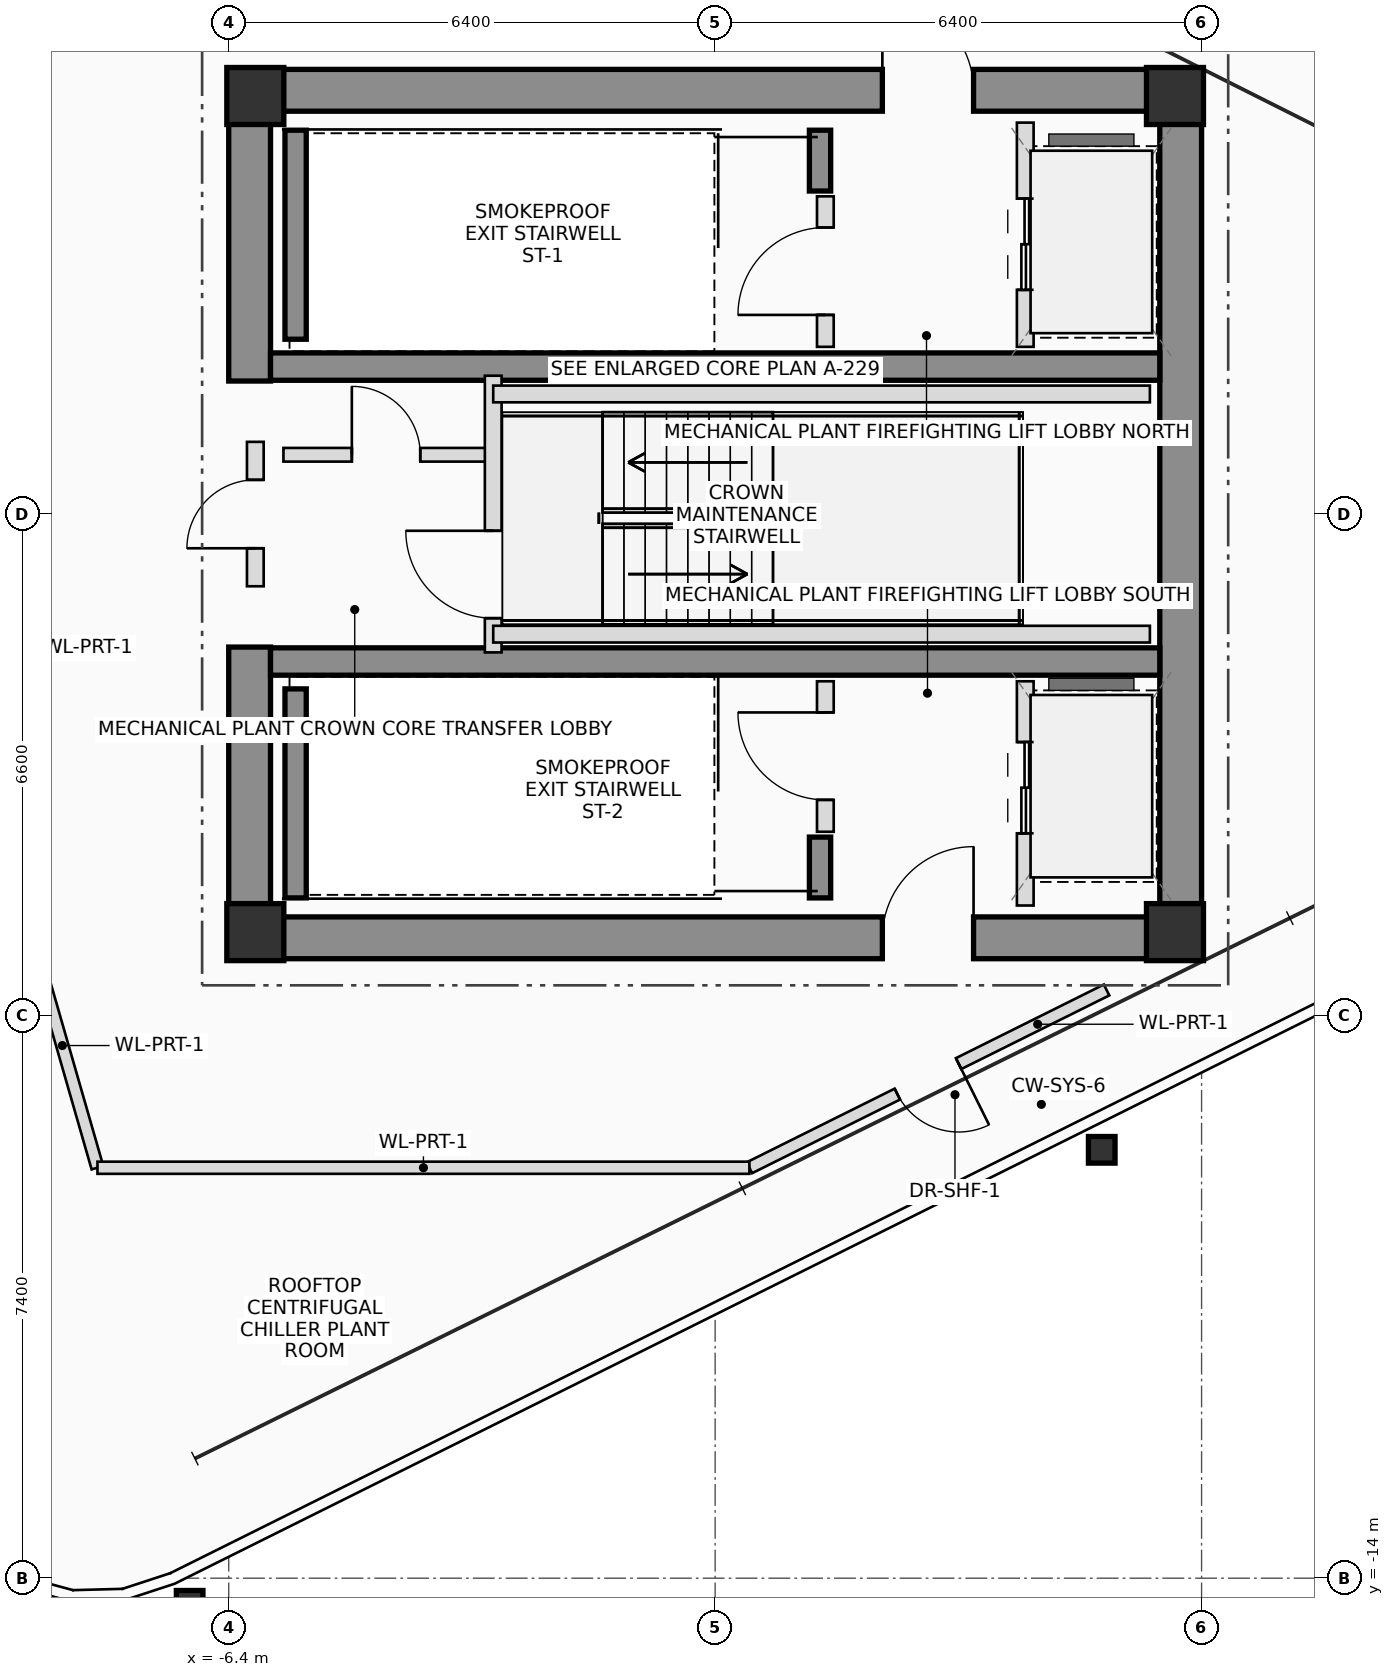
"""IFC4 building model, lengths in metres.
Left out: names, types, materials, properties, quantities, classifications, styles, units other than length and angle.
Written with IfcOpenShell. Run it as: python <this file> out.ifc"""

import sys

from ifc_helpers import new_model, si_unit, direction, frame, frame_2d, origin, origin_2d, place, context, subcontext, project, spatial, rectangle, i_section, extrude, source, transform, mapped, element, fill, save


model = new_model("IFC4")
c1 = context("Model", 3, precision=1e-05, world=origin(), true_north=direction((0.0, 1.0)))
c2 = subcontext(c1, "Body", "Model", "MODEL_VIEW")
j1 = project(units=[si_unit("LENGTHUNIT", "METRE"), si_unit("PLANEANGLEUNIT", "RADIAN")], contexts=[c1])
p1 = place(None, origin())
s1 = spatial("IfcSite", under=j1, at=p1, CompositionType="ELEMENT")
p2 = place(p1, origin())
s2 = spatial("IfcBuilding", under=s1, at=p2, CompositionType="ELEMENT")
p3 = place(p2, frame((0.0, 0.0, 322.85)))
s3 = spatial("IfcBuildingStorey", under=s2, at=p3, CompositionType="ELEMENT", Elevation=322.85)
m1 = source(origin(), c2, "Body", "SweptSolid", [
    extrude(rectangle(XDim=0.75, YDim=0.75, at=origin_2d()), origin(), (0.0, 0.0, 1.0), 5.4),
])
for number, where, z_axis, x_axis in (
    (1, (-6.05, -5.5, 0.0), (0.0, 0.0, 1.0), (1.0, 0.0, 0.0)),
    (2, (6.05, -5.5, 0.0), (0.0, 0.0, 1.0), (1.0, 0.0, 0.0)),
    (3, (6.05, 5.5, 0.0), (0.0, 0.0, 1.0), (1.0, 0.0, 0.0)),
    (4, (-6.05, 5.5, 0.0), (0.0, 0.0, 1.0), (1.0, 0.0, 0.0)),
):
    element("IfcColumn", number, at=place(p3, frame(where, z_axis=z_axis, x_axis=x_axis)), inside=s3, PredefinedType="COLUMN", context=c2, shape_type="MappedRepresentation", body=[
        mapped(m1, transform((0.0, 0.0, 0.0), scale=1.0)),
    ])
p4 = place(p3, frame((-6.4, 5.575, 0.0), z_axis=(0.0, 0.0, 1.0), x_axis=(1.0, 0.0, 0.0)))
e5 = element("IfcWall", 5, at=p4, inside=s3, PredefinedType="SHEAR", context=c2, shape_type="SweptSolid", body=[
    extrude(rectangle(XDim=12.8, YDim=0.55, at=frame_2d((6.4, 0.0))), origin(), (0.0, 0.0, 1.0), 5.4),
])
p5 = place(p4, frame((8.6, 0.0, 0.0)))
e6 = element("IfcOpeningElement", 6, at=p5, cuts=e5, PredefinedType="OPENING", context=c2, shape_type="SweptSolid", body=[
    extrude(rectangle(XDim=1.2, YDim=2.2, at=frame_2d((0.6, 1.1))), frame((0.0, 0.285, 0.0), z_axis=(0.0, -1.0, 0.0), x_axis=(1.0, 0.0, 0.0)), (0.0, 0.0, 1.0), 0.57),
])
p6 = place(p3, frame((-6.4, -5.575, 0.0), z_axis=(0.0, 0.0, 1.0), x_axis=(1.0, 0.0, 0.0)))
e7 = element("IfcWall", 7, at=p6, inside=s3, PredefinedType="SHEAR", context=c2, shape_type="SweptSolid", body=[
    extrude(rectangle(XDim=12.8, YDim=0.55, at=frame_2d((6.4, 0.0))), origin(), (0.0, 0.0, 1.0), 5.4),
])
p7 = place(p6, frame((8.6, 0.0, 0.0)))
e8 = element("IfcOpeningElement", 8, at=p7, cuts=e7, PredefinedType="OPENING", context=c2, shape_type="SweptSolid", body=[
    extrude(rectangle(XDim=1.2, YDim=2.2, at=frame_2d((0.6, 1.1))), frame((0.0, 0.285, 0.0), z_axis=(0.0, -1.0, 0.0), x_axis=(1.0, 0.0, 0.0)), (0.0, 0.0, 1.0), 0.57),
])
p8 = place(p3, frame((6.125, -5.3, 0.0), z_axis=(0.0, 0.0, 1.0), x_axis=(0.0, 1.0, 0.0)))
e9 = element("IfcWall", 9, at=p8, inside=s3, PredefinedType="SHEAR", context=c2, shape_type="SweptSolid", body=[
    extrude(rectangle(XDim=10.6, YDim=0.55, at=frame_2d((5.3, 0.0))), origin(), (0.0, 0.0, 1.0), 5.4),
])
for number, where, z_axis, x_axis in (
    (10, (-6.125, -5.3, 0.0), (0.0, 0.0, 1.0), (0.0, 1.0, 0.0)),
    (11, (-6.125, 1.75, 0.0), (0.0, 0.0, 1.0), (0.0, 1.0, 0.0)),
):
    element("IfcWall", number, at=place(p3, frame(where, z_axis=z_axis, x_axis=x_axis)), inside=s3, PredefinedType="SHEAR", context=c2, shape_type="SweptSolid", body=[
        extrude(rectangle(XDim=3.55, YDim=0.55, at=frame_2d((1.775, 0.0))), origin(), (0.0, 0.0, 1.0), 5.4),
    ])
for number, where, z_axis, x_axis in (
    (12, (-5.85, 1.94, 0.0), (0.0, 0.0, 1.0), (1.0, 0.0, 0.0)),
    (13, (-5.85, -1.94, 0.0), (0.0, 0.0, 1.0), (1.0, 0.0, 0.0)),
):
    element("IfcWall", number, at=place(p3, frame(where, z_axis=z_axis, x_axis=x_axis)), inside=s3, PredefinedType="SHEAR", context=c2, shape_type="SweptSolid", body=[
        extrude(rectangle(XDim=11.7, YDim=0.36, at=frame_2d((5.85, 0.0))), origin(), (0.0, 0.0, 1.0), 5.4),
    ])
p9 = place(p3, frame((-5.52, 2.3, 0.0), z_axis=(0.0, 0.0, 1.0), x_axis=(0.0, 1.0, 0.0)))
e14 = element("IfcWall", 14, at=p9, inside=s3, PredefinedType="SHEAR", context=c2, shape_type="SweptSolid", body=[
    extrude(rectangle(XDim=2.75, YDim=0.28, at=frame_2d((1.375, 0.0))), origin(), (0.0, 0.0, 1.0), 5.4),
])
p10 = place(p3, frame((1.38, 4.25, 0.0), z_axis=(0.0, 0.0, 1.0), x_axis=(0.0, 1.0, 0.0)))
e15 = element("IfcWall", 15, at=p10, inside=s3, PredefinedType="SHEAR", context=c2, shape_type="SweptSolid", body=[
    extrude(rectangle(XDim=0.8, YDim=0.28, at=frame_2d((0.4, 0.0))), origin(), (0.0, 0.0, 1.0), 5.4),
])
p11 = place(p3, frame((-5.52, -5.05, 0.0), z_axis=(0.0, 0.0, 1.0), x_axis=(0.0, 1.0, 0.0)))
e16 = element("IfcWall", 16, at=p11, inside=s3, PredefinedType="SHEAR", context=c2, shape_type="SweptSolid", body=[
    extrude(rectangle(XDim=2.75, YDim=0.28, at=frame_2d((1.375, 0.0))), origin(), (0.0, 0.0, 1.0), 5.4),
])
p12 = place(p3, frame((1.38, -5.05, 0.0), z_axis=(0.0, 0.0, 1.0), x_axis=(0.0, 1.0, 0.0)))
e17 = element("IfcWall", 17, at=p12, inside=s3, PredefinedType="SHEAR", context=c2, shape_type="SweptSolid", body=[
    extrude(rectangle(XDim=0.8, YDim=0.28, at=frame_2d((0.4, 0.0))), origin(), (0.0, 0.0, 1.0), 5.4),
])
m2 = source(origin(), c2, "Body", "SweptSolid", [
    extrude(i_section(OverallWidth=0.35, OverallDepth=0.35, WebThickness=0.012, FlangeThickness=0.019, FilletRadius=0.016, at=origin_2d()), origin(), (0.0, 0.0, 1.0), 5.4),
])
for number, where, z_axis, x_axis in (
    (18, (-6.914, -14.337, 0.0), (0.0, 0.0, 1.0), (1.0, 0.0, 0.0)),
    (19, (5.086, -8.364, 0.0), (0.0, 0.0, 1.0), (1.0, 0.0, 0.0)),
):
    element("IfcColumn", number, at=place(p3, frame(where, z_axis=z_axis, x_axis=x_axis)), inside=s3, PredefinedType="COLUMN", context=c2, shape_type="MappedRepresentation", body=[
        mapped(m2, transform((0.0, 0.0, 0.0), scale=1.0)),
    ])
p13 = place(p3, frame((-6.05, -0.95, 0.0), z_axis=(0.0, 0.0, 1.0), x_axis=(0.0, 1.0, 0.0)))
e20 = element("IfcWall", 20, at=p13, inside=s3, PredefinedType="PLUMBINGWALL", context=c2, shape_type="SweptSolid", body=[
    extrude(rectangle(XDim=1.9, YDim=0.22, at=frame_2d((0.95, 0.0))), origin(), (0.0, 0.0, 1.0), 4.1),
])
p14 = place(p13, frame((0.5, 0.0, 0.0)))
e21 = element("IfcOpeningElement", 21, at=p14, cuts=e20, PredefinedType="OPENING", context=c2, shape_type="SweptSolid", body=[
    extrude(rectangle(XDim=0.9, YDim=2.05, at=frame_2d((0.45, 1.025))), frame((0.0, 0.12, 0.0), z_axis=(0.0, -1.0, 0.0), x_axis=(1.0, 0.0, 0.0)), (0.0, 0.0, 1.0), 0.24),
])
p15 = place(p3, frame((1.45, 2.2, 0.0), z_axis=(0.0, 0.0, 1.0), x_axis=(0.0, 1.0, 0.0)))
e22 = element("IfcWall", 22, at=p15, inside=s3, PredefinedType="PLUMBINGWALL", context=c2, shape_type="SweptSolid", body=[
    extrude(rectangle(XDim=1.98, YDim=0.22, at=frame_2d((0.99, 0.0))), origin(), (0.0, 0.0, 1.0), 5.12),
])
p16 = place(p15, frame((0.42, 0.0, 0.0)))
e23 = element("IfcOpeningElement", 23, at=p16, cuts=e22, PredefinedType="OPENING", context=c2, shape_type="SweptSolid", body=[
    extrude(rectangle(XDim=1.15, YDim=2.15, at=frame_2d((0.575, 1.075))), frame((0.0, 0.12, 0.0), z_axis=(0.0, -1.0, 0.0), x_axis=(1.0, 0.0, 0.0)), (0.0, 0.0, 1.0), 0.24),
])
p17 = place(p3, frame((4.08, 2.2, 0.0), z_axis=(0.0, 0.0, 1.0), x_axis=(0.0, 1.0, 0.0)))
e24 = element("IfcWall", 24, at=p17, inside=s3, PredefinedType="PLUMBINGWALL", context=c2, shape_type="SweptSolid", body=[
    extrude(rectangle(XDim=2.95, YDim=0.22, at=frame_2d((1.475, 0.0))), origin(), (0.0, 0.0, 1.0), 5.12),
])
p18 = place(p17, frame((0.75, 0.0, 0.0)))
e25 = element("IfcOpeningElement", 25, at=p18, cuts=e24, PredefinedType="OPENING", context=c2, shape_type="SweptSolid", body=[
    extrude(rectangle(XDim=1.2, YDim=2.25, at=frame_2d((0.6, 1.125))), frame((0.0, 0.12, 0.0), z_axis=(0.0, -1.0, 0.0), x_axis=(1.0, 0.0, 0.0)), (0.0, 0.0, 1.0), 0.24),
])
p19 = place(p3, frame((1.45, -4.18, 0.0), z_axis=(0.0, 0.0, 1.0), x_axis=(0.0, 1.0, 0.0)))
e26 = element("IfcWall", 26, at=p19, inside=s3, PredefinedType="PLUMBINGWALL", context=c2, shape_type="SweptSolid", body=[
    extrude(rectangle(XDim=1.98, YDim=0.22, at=frame_2d((0.99, 0.0))), origin(), (0.0, 0.0, 1.0), 5.12),
])
p20 = place(p19, frame((0.42, 0.0, 0.0)))
e27 = element("IfcOpeningElement", 27, at=p20, cuts=e26, PredefinedType="OPENING", context=c2, shape_type="SweptSolid", body=[
    extrude(rectangle(XDim=1.15, YDim=2.15, at=frame_2d((0.575, 1.075))), frame((0.0, 0.12, 0.0), z_axis=(0.0, -1.0, 0.0), x_axis=(1.0, 0.0, 0.0)), (0.0, 0.0, 1.0), 0.24),
])
p21 = place(p3, frame((4.08, -5.15, 0.0), z_axis=(0.0, 0.0, 1.0), x_axis=(0.0, 1.0, 0.0)))
e28 = element("IfcWall", 28, at=p21, inside=s3, PredefinedType="PLUMBINGWALL", context=c2, shape_type="SweptSolid", body=[
    extrude(rectangle(XDim=2.95, YDim=0.22, at=frame_2d((1.475, 0.0))), origin(), (0.0, 0.0, 1.0), 5.12),
])
p22 = place(p21, frame((0.95, 0.0, 0.0)))
e29 = element("IfcOpeningElement", 29, at=p22, cuts=e28, PredefinedType="OPENING", context=c2, shape_type="SweptSolid", body=[
    extrude(rectangle(XDim=1.2, YDim=2.25, at=frame_2d((0.6, 1.125))), frame((0.0, 0.12, 0.0), z_axis=(0.0, -1.0, 0.0), x_axis=(1.0, 0.0, 0.0)), (0.0, 0.0, 1.0), 0.24),
])
p23 = place(p3, frame((-5.68, 0.78, 0.0), z_axis=(0.0, 0.0, 1.0), x_axis=(1.0, 0.0, 0.0)))
e30 = element("IfcWall", 30, at=p23, inside=s3, PredefinedType="PLUMBINGWALL", context=c2, shape_type="SweptSolid", body=[
    extrude(rectangle(XDim=2.76, YDim=0.18, at=frame_2d((1.38, 0.0))), origin(), (0.0, 0.0, 1.0), 5.12),
])
p24 = place(p23, frame((0.9, 0.0, 0.0)))
e31 = element("IfcOpeningElement", 31, at=p24, cuts=e30, PredefinedType="OPENING", context=c2, shape_type="SweptSolid", body=[
    extrude(rectangle(XDim=0.9, YDim=2.05, at=frame_2d((0.45, 1.025))), frame((0.0, 0.1, 0.0), z_axis=(0.0, -1.0, 0.0), x_axis=(1.0, 0.0, 0.0)), (0.0, 0.0, 1.0), 0.2),
])
p25 = place(p3, frame((-2.92, -1.82, 0.0), z_axis=(0.0, 0.0, 1.0), x_axis=(0.0, 1.0, 0.0)))
e32 = element("IfcWall", 32, at=p25, inside=s3, PredefinedType="PLUMBINGWALL", context=c2, shape_type="SweptSolid", body=[
    extrude(rectangle(XDim=3.64, YDim=0.22, at=frame_2d((1.82, 0.0))), origin(), (0.0, 0.0, 1.0), 5.12),
])
p26 = place(p25, frame((0.45, 0.0, 0.0)))
e33 = element("IfcOpeningElement", 33, at=p26, cuts=e32, PredefinedType="OPENING", context=c2, shape_type="SweptSolid", body=[
    extrude(rectangle(XDim=1.15, YDim=2.15, at=frame_2d((0.575, 1.075))), frame((0.0, 0.12, 0.0), z_axis=(0.0, -1.0, 0.0), x_axis=(1.0, 0.0, 0.0)), (0.0, 0.0, 1.0), 0.24),
])
for number, where, z_axis, x_axis in (
    (34, (-2.92, 1.58, 0.0), (0.0, 0.0, 1.0), (1.0, 0.0, 0.0)),
    (35, (-2.92, -1.58, 0.0), (0.0, 0.0, 1.0), (1.0, 0.0, 0.0)),
):
    element("IfcWall", number, at=place(p3, frame(where, z_axis=z_axis, x_axis=x_axis)), inside=s3, PredefinedType="PLUMBINGWALL", context=c2, shape_type="SweptSolid", body=[
        extrude(rectangle(XDim=8.64, YDim=0.22, at=frame_2d((4.32, 0.0))), origin(), (0.0, 0.0, 1.0), 3.59),
    ])
p27 = place(p3, frame((-8.127, -8.6, 0.0), z_axis=(0.0, 0.0, 1.0), x_axis=(-0.276397565718, 0.961043383862, 0.0)))
e36 = element("IfcWall", 36, at=p27, inside=s3, PredefinedType="PARTITIONING", context=c2, shape_type="SweptSolid", body=[
    extrude(rectangle(XDim=3.346, YDim=0.16, at=frame_2d((1.673, 0.0))), origin(), (0.0, 0.0, 1.0), 5.12),
])
p28 = place(p3, frame((5.15, -6.261, 0.0), z_axis=(0.0, 0.0, 1.0), x_axis=(-0.895225733131, -0.445612933766, 0.0)))
e37 = element("IfcWall", 37, at=p28, inside=s3, PredefinedType="PARTITIONING", context=c2, shape_type="SweptSolid", body=[
    extrude(rectangle(XDim=5.249, YDim=0.16, at=frame_2d((2.625, 0.0))), origin(), (0.0, 0.0, 1.0), 5.12),
])
p29 = place(p28, frame((2.175, 0.0, 0.0)))
e38 = element("IfcOpeningElement", 38, at=p29, cuts=e37, PredefinedType="OPENING", context=c2, shape_type="SweptSolid", body=[
    extrude(rectangle(XDim=0.9, YDim=2.05, at=frame_2d((0.45, 1.025))), frame((0.0, 0.09, 0.0), z_axis=(0.0, -1.0, 0.0), x_axis=(1.0, 0.0, 0.0)), (0.0, 0.0, 1.0), 0.18),
])
p30 = place(p3, frame((0.451, -8.6, 0.0), z_axis=(0.0, 0.0, 1.0), x_axis=(-1.0, 0.0, 0.0)))
e39 = element("IfcWall", 39, at=p30, inside=s3, PredefinedType="PARTITIONING", context=c2, shape_type="SweptSolid", body=[
    extrude(rectangle(XDim=8.578, YDim=0.16, at=frame_2d((4.289, 0.0))), origin(), (0.0, 0.0, 1.0), 5.12),
])
p31 = place(p5, origin())
e40 = element("IfcDoor", 40, at=p31, inside=s3, OperationType="SINGLE_SWING_LEFT", PredefinedType="DOOR", context=c2, shape_type="SweptSolid", body=[
    extrude(rectangle(XDim=1.2, YDim=2.2, at=frame_2d((0.6, 1.1))), frame((0.0, 0.025, 0.0), z_axis=(0.0, -1.0, 0.0), x_axis=(1.0, 0.0, 0.0)), (0.0, 0.0, 1.0), 0.05),
])
fill(e6, e40)
p32 = place(p7, origin())
e41 = element("IfcDoor", 41, at=p32, inside=s3, OperationType="SINGLE_SWING_RIGHT", PredefinedType="DOOR", context=c2, shape_type="SweptSolid", body=[
    extrude(rectangle(XDim=1.2, YDim=2.2, at=frame_2d((0.6, 1.1))), frame((0.0, 0.025, 0.0), z_axis=(0.0, -1.0, 0.0), x_axis=(1.0, 0.0, 0.0)), (0.0, 0.0, 1.0), 0.05),
])
fill(e8, e41)
p33 = place(p14, origin())
e42 = element("IfcDoor", 42, at=p33, inside=s3, OperationType="SINGLE_SWING_LEFT", PredefinedType="DOOR", context=c2, shape_type="SweptSolid", body=[
    extrude(rectangle(XDim=0.9, YDim=2.05, at=frame_2d((0.45, 1.025))), frame((0.0, 0.025, 0.0), z_axis=(0.0, -1.0, 0.0), x_axis=(1.0, 0.0, 0.0)), (0.0, 0.0, 1.0), 0.05),
])
fill(e21, e42)
p34 = place(p16, origin())
e43 = element("IfcDoor", 43, at=p34, inside=s3, OperationType="SINGLE_SWING_LEFT", PredefinedType="DOOR", context=c2, shape_type="SweptSolid", body=[
    extrude(rectangle(XDim=1.15, YDim=2.15, at=frame_2d((0.575, 1.075))), frame((0.0, 0.025, 0.0), z_axis=(0.0, -1.0, 0.0), x_axis=(1.0, 0.0, 0.0)), (0.0, 0.0, 1.0), 0.05),
])
fill(e23, e43)
p35 = place(p18, origin())
e44 = element("IfcDoor", 44, at=p35, inside=s3, OperationType="DOUBLE_DOOR_SLIDING", PredefinedType="DOOR", context=c2, shape_type="SweptSolid", body=[
    extrude(rectangle(XDim=1.2, YDim=2.25, at=frame_2d((0.6, 1.125))), frame((0.0, 0.025, 0.0), z_axis=(0.0, -1.0, 0.0), x_axis=(1.0, 0.0, 0.0)), (0.0, 0.0, 1.0), 0.05),
])
fill(e25, e44)
p36 = place(p20, origin())
e45 = element("IfcDoor", 45, at=p36, inside=s3, OperationType="SINGLE_SWING_RIGHT", PredefinedType="DOOR", context=c2, shape_type="SweptSolid", body=[
    extrude(rectangle(XDim=1.15, YDim=2.15, at=frame_2d((0.575, 1.075))), frame((0.0, 0.025, 0.0), z_axis=(0.0, -1.0, 0.0), x_axis=(1.0, 0.0, 0.0)), (0.0, 0.0, 1.0), 0.05),
])
fill(e27, e45)
p37 = place(p22, origin())
e46 = element("IfcDoor", 46, at=p37, inside=s3, OperationType="DOUBLE_DOOR_SLIDING", PredefinedType="DOOR", context=c2, shape_type="SweptSolid", body=[
    extrude(rectangle(XDim=1.2, YDim=2.25, at=frame_2d((0.6, 1.125))), frame((0.0, 0.025, 0.0), z_axis=(0.0, -1.0, 0.0), x_axis=(1.0, 0.0, 0.0)), (0.0, 0.0, 1.0), 0.05),
])
fill(e29, e46)
p38 = place(p24, origin())
e47 = element("IfcDoor", 47, at=p38, inside=s3, OperationType="SINGLE_SWING_LEFT", PredefinedType="DOOR", context=c2, shape_type="SweptSolid", body=[
    extrude(rectangle(XDim=0.9, YDim=2.05, at=frame_2d((0.45, 1.025))), frame((0.0, 0.025, 0.0), z_axis=(0.0, -1.0, 0.0), x_axis=(1.0, 0.0, 0.0)), (0.0, 0.0, 1.0), 0.05),
])
fill(e31, e47)
p39 = place(p26, origin())
e48 = element("IfcDoor", 48, at=p39, inside=s3, OperationType="SINGLE_SWING_RIGHT", PredefinedType="DOOR", context=c2, shape_type="SweptSolid", body=[
    extrude(rectangle(XDim=1.15, YDim=2.15, at=frame_2d((0.575, 1.075))), frame((0.0, 0.025, 0.0), z_axis=(0.0, -1.0, 0.0), x_axis=(1.0, 0.0, 0.0)), (0.0, 0.0, 1.0), 0.05),
])
fill(e33, e48)
p40 = place(p29, origin())
e49 = element("IfcDoor", 49, at=p40, inside=s3, OperationType="SINGLE_SWING_LEFT", PredefinedType="DOOR", context=c2, shape_type="SweptSolid", body=[
    extrude(rectangle(XDim=0.9, YDim=2.05, at=frame_2d((0.45, 1.025))), frame((0.0, 0.025, 0.0), z_axis=(0.0, -1.0, 0.0), x_axis=(1.0, 0.0, 0.0)), (0.0, 0.0, 1.0), 0.05),
])
fill(e38, e49)
save(model, sys.argv[1])
